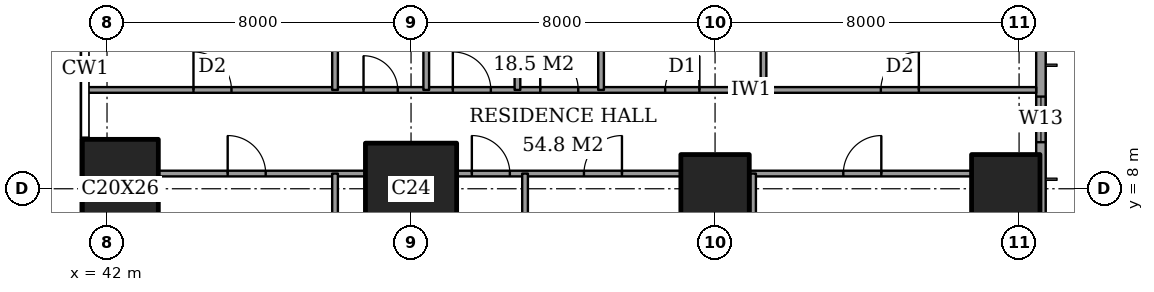
"""IFC4 building model, lengths in metres.
Left out: names, types, materials, properties, quantities, classifications, styles, units other than length and angle.
Written with IfcOpenShell. Run it as: python <this file> out.ifc"""

import sys

from ifc_helpers import new_model, si_unit, direction, frame, frame_2d, origin, origin_2d, place, context, subcontext, project, spatial, rectangle, extrude, element, fill, save


model = new_model("IFC4")
c1 = context("Model", 3, precision=1e-05, world=origin(), true_north=direction((0.0, 1.0)))
c2 = subcontext(c1, "Body", "Model", "MODEL_VIEW")
j1 = project(units=[si_unit("LENGTHUNIT", "METRE"), si_unit("PLANEANGLEUNIT", "RADIAN")], contexts=[c1])
p1 = place(None, origin())
s1 = spatial("IfcSite", under=j1, at=p1, CompositionType="ELEMENT")
p2 = place(p1, origin())
s2 = spatial("IfcBuilding", under=s1, at=p2, CompositionType="ELEMENT")
p3 = place(p2, frame((0.0, 0.0, 193.0)))
s3 = spatial("IfcBuildingStorey", under=s2, at=p3, CompositionType="ELEMENT", Elevation=193.0)
p4 = place(p3, frame((42.35, 8.0, 0.0), z_axis=(0.0, 0.0, 1.0), x_axis=(1.0, 0.0, 0.0)))
e1 = element("IfcColumn", 1, at=p4, inside=s3, PredefinedType="COLUMN", context=c2, shape_type="SweptSolid", body=[
    extrude(rectangle(XDim=2.0, YDim=2.6, at=origin_2d()), origin(), (0.0, 0.0, 1.0), 3.6),
])
p5 = place(p3, frame((50.0, 8.0, 0.0), z_axis=(0.0, 0.0, 1.0), x_axis=(1.0, 0.0, 0.0)))
e2 = element("IfcColumn", 2, at=p5, inside=s3, PredefinedType="COLUMN", context=c2, shape_type="SweptSolid", body=[
    extrude(rectangle(XDim=2.4, YDim=2.4, at=origin_2d()), origin(), (0.0, 0.0, 1.0), 3.6),
])
for number, where, z_axis, x_axis in (
    (3, (58.0, 8.0, 0.0), (0.0, 0.0, 1.0), (1.0, 0.0, 0.0)),
    (4, (65.65, 8.0, 0.0), (0.0, 0.0, 1.0), (1.0, 0.0, 0.0)),
):
    element("IfcColumn", number, at=place(p3, frame(where, z_axis=z_axis, x_axis=x_axis)), inside=s3, PredefinedType="COLUMN", context=c2, shape_type="SweptSolid", body=[
        extrude(rectangle(XDim=1.8, YDim=1.8, at=origin_2d()), origin(), (0.0, 0.0, 1.0), 3.6),
    ])
p6 = place(p3, frame((66.575, 3.175, 0.0), z_axis=(0.0, 0.0, 1.0), x_axis=(0.0, 1.0, 0.0)))
e5 = element("IfcWall", 5, at=p6, inside=s3, PredefinedType="SOLIDWALL", context=c2, shape_type="SweptSolid", body=[
    extrude(rectangle(XDim=41.65, YDim=0.25, at=frame_2d((20.825, 0.0))), origin(), (0.0, 0.0, 1.0), 3.6),
])
p7 = place(p6, frame((0.825, 0.0, 0.2)))
e6 = element("IfcOpeningElement", 6, at=p7, cuts=e5, PredefinedType="OPENING", context=c2, shape_type="SweptSolid", body=[
    extrude(rectangle(XDim=2.4, YDim=2.4, at=frame_2d((1.2, 1.2))), frame((0.0, 0.135, 0.0), z_axis=(0.0, -1.0, 0.0), x_axis=(1.0, 0.0, 0.0)), (0.0, 0.0, 1.0), 0.27),
])
p8 = place(p6, frame((6.05, 0.0, 0.2)))
e7 = element("IfcOpeningElement", 7, at=p8, cuts=e5, PredefinedType="OPENING", context=c2, shape_type="SweptSolid", body=[
    extrude(rectangle(XDim=1.2, YDim=2.4, at=frame_2d((0.6, 1.2))), frame((0.0, 0.135, 0.0), z_axis=(0.0, -1.0, 0.0), x_axis=(1.0, 0.0, 0.0)), (0.0, 0.0, 1.0), 0.27),
])
p9 = place(p6, frame((8.475, 0.0, 0.2)))
e8 = element("IfcOpeningElement", 8, at=p9, cuts=e5, PredefinedType="OPENING", context=c2, shape_type="SweptSolid", body=[
    extrude(rectangle(XDim=2.4, YDim=2.4, at=frame_2d((1.2, 1.2))), frame((0.0, 0.135, 0.0), z_axis=(0.0, -1.0, 0.0), x_axis=(1.0, 0.0, 0.0)), (0.0, 0.0, 1.0), 0.27),
])
p10 = place(p6, frame((15.675, 0.0, 0.2)))
e9 = element("IfcOpeningElement", 9, at=p10, cuts=e5, PredefinedType="OPENING", context=c2, shape_type="SweptSolid", body=[
    extrude(rectangle(XDim=2.4, YDim=2.4, at=frame_2d((1.2, 1.2))), frame((0.0, 0.135, 0.0), z_axis=(0.0, -1.0, 0.0), x_axis=(1.0, 0.0, 0.0)), (0.0, 0.0, 1.0), 0.27),
])
p11 = place(p6, frame((23.625, 0.0, 0.2)))
e10 = element("IfcOpeningElement", 10, at=p11, cuts=e5, PredefinedType="OPENING", context=c2, shape_type="SweptSolid", body=[
    extrude(rectangle(XDim=2.4, YDim=2.4, at=frame_2d((1.2, 1.2))), frame((0.0, 0.135, 0.0), z_axis=(0.0, -1.0, 0.0), x_axis=(1.0, 0.0, 0.0)), (0.0, 0.0, 1.0), 0.27),
])
p12 = place(p6, frame((30.775, 0.0, 0.2)))
e11 = element("IfcOpeningElement", 11, at=p12, cuts=e5, PredefinedType="OPENING", context=c2, shape_type="SweptSolid", body=[
    extrude(rectangle(XDim=2.4, YDim=2.4, at=frame_2d((1.2, 1.2))), frame((0.0, 0.135, 0.0), z_axis=(0.0, -1.0, 0.0), x_axis=(1.0, 0.0, 0.0)), (0.0, 0.0, 1.0), 0.27),
])
p13 = place(p6, frame((34.55, 0.0, 0.2)))
e12 = element("IfcOpeningElement", 12, at=p13, cuts=e5, PredefinedType="OPENING", context=c2, shape_type="SweptSolid", body=[
    extrude(rectangle(XDim=1.2, YDim=2.4, at=frame_2d((0.6, 1.2))), frame((0.0, 0.135, 0.0), z_axis=(0.0, -1.0, 0.0), x_axis=(1.0, 0.0, 0.0)), (0.0, 0.0, 1.0), 0.27),
])
p14 = place(p6, frame((38.425, 0.0, 0.2)))
e13 = element("IfcOpeningElement", 13, at=p14, cuts=e5, PredefinedType="OPENING", context=c2, shape_type="SweptSolid", body=[
    extrude(rectangle(XDim=2.4, YDim=2.4, at=frame_2d((1.2, 1.2))), frame((0.0, 0.135, 0.0), z_axis=(0.0, -1.0, 0.0), x_axis=(1.0, 0.0, 0.0)), (0.0, 0.0, 1.0), 0.27),
])
p15 = place(p3, frame((43.35, 8.4, 0.0), z_axis=(0.0, 0.0, 1.0), x_axis=(1.0, 0.0, 0.0)))
e14 = element("IfcWall", 14, at=p15, inside=s3, PredefinedType="PARTITIONING", context=c2, shape_type="SweptSolid", body=[
    extrude(rectangle(XDim=5.45, YDim=0.15, at=frame_2d((2.725, 0.0))), origin(), (0.0, 0.0, 1.0), 3.35),
])
p16 = place(p15, frame((1.825, 0.0, 0.0)))
e15 = element("IfcOpeningElement", 15, at=p16, cuts=e14, PredefinedType="OPENING", context=c2, shape_type="SweptSolid", body=[
    extrude(rectangle(XDim=1.0, YDim=2.1, at=frame_2d((0.5, 1.05))), frame((0.0, 0.085, 0.0), z_axis=(0.0, -1.0, 0.0), x_axis=(1.0, 0.0, 0.0)), (0.0, 0.0, 1.0), 0.17),
])
p17 = place(p3, frame((51.2, 8.4, 0.0), z_axis=(0.0, 0.0, 1.0), x_axis=(1.0, 0.0, 0.0)))
e16 = element("IfcWall", 16, at=p17, inside=s3, PredefinedType="PARTITIONING", context=c2, shape_type="SweptSolid", body=[
    extrude(rectangle(XDim=5.9, YDim=0.15, at=frame_2d((2.95, 0.0))), origin(), (0.0, 0.0, 1.0), 3.35),
])
p18 = place(p17, frame((3.35, 0.0, 0.0)))
e17 = element("IfcOpeningElement", 17, at=p18, cuts=e16, PredefinedType="OPENING", context=c2, shape_type="SweptSolid", body=[
    extrude(rectangle(XDim=1.0, YDim=2.1, at=frame_2d((0.5, 1.05))), frame((0.0, 0.085, 0.0), z_axis=(0.0, -1.0, 0.0), x_axis=(1.0, 0.0, 0.0)), (0.0, 0.0, 1.0), 0.17),
])
p19 = place(p17, frame((0.4, 0.0, 0.0)))
e18 = element("IfcOpeningElement", 18, at=p19, cuts=e16, PredefinedType="OPENING", context=c2, shape_type="SweptSolid", body=[
    extrude(rectangle(XDim=1.0, YDim=2.1, at=frame_2d((0.5, 1.05))), frame((0.0, 0.085, 0.0), z_axis=(0.0, -1.0, 0.0), x_axis=(1.0, 0.0, 0.0)), (0.0, 0.0, 1.0), 0.17),
])
p20 = place(p3, frame((58.9, 8.4, 0.0), z_axis=(0.0, 0.0, 1.0), x_axis=(1.0, 0.0, 0.0)))
e19 = element("IfcWall", 19, at=p20, inside=s3, PredefinedType="PARTITIONING", context=c2, shape_type="SweptSolid", body=[
    extrude(rectangle(XDim=5.85, YDim=0.15, at=frame_2d((2.925, 0.0))), origin(), (0.0, 0.0, 1.0), 3.35),
])
p21 = place(p20, frame((2.475, 0.0, 0.0)))
e20 = element("IfcOpeningElement", 20, at=p21, cuts=e19, PredefinedType="OPENING", context=c2, shape_type="SweptSolid", body=[
    extrude(rectangle(XDim=1.0, YDim=2.1, at=frame_2d((0.5, 1.05))), frame((0.0, 0.085, 0.0), z_axis=(0.0, -1.0, 0.0), x_axis=(1.0, 0.0, 0.0)), (0.0, 0.0, 1.0), 0.17),
])
p22 = place(p3, frame((41.439, 10.6, 0.0), z_axis=(0.0, 0.0, 1.0), x_axis=(1.0, 0.0, 0.0)))
e21 = element("IfcWall", 21, at=p22, inside=s3, PredefinedType="PARTITIONING", context=c2, shape_type="SweptSolid", body=[
    extrude(rectangle(XDim=25.011, YDim=0.15, at=frame_2d((12.505, 0.0))), origin(), (0.0, 0.0, 1.0), 3.35),
])
p23 = place(p22, frame((11.961, 0.0, 0.0)))
e22 = element("IfcOpeningElement", 22, at=p23, cuts=e21, PredefinedType="OPENING", context=c2, shape_type="SweptSolid", body=[
    extrude(rectangle(XDim=1.0, YDim=2.1, at=frame_2d((0.5, 1.05))), frame((0.0, 0.085, 0.0), z_axis=(0.0, -1.0, 0.0), x_axis=(1.0, 0.0, 0.0)), (0.0, 0.0, 1.0), 0.17),
])
p24 = place(p22, frame((20.924, 0.0, 0.0)))
e23 = element("IfcOpeningElement", 23, at=p24, cuts=e21, PredefinedType="OPENING", context=c2, shape_type="SweptSolid", body=[
    extrude(rectangle(XDim=1.0, YDim=2.1, at=frame_2d((0.5, 1.05))), frame((0.0, 0.085, 0.0), z_axis=(0.0, -1.0, 0.0), x_axis=(1.0, 0.0, 0.0)), (0.0, 0.0, 1.0), 0.17),
])
p25 = place(p22, frame((15.249, 0.0, 0.0)))
e24 = element("IfcOpeningElement", 24, at=p25, cuts=e21, PredefinedType="OPENING", context=c2, shape_type="SweptSolid", body=[
    extrude(rectangle(XDim=0.9, YDim=2.1, at=frame_2d((0.45, 1.05))), frame((0.0, 0.085, 0.0), z_axis=(0.0, -1.0, 0.0), x_axis=(1.0, 0.0, 0.0)), (0.0, 0.0, 1.0), 0.17),
])
p26 = place(p22, frame((9.661, 0.0, 0.0)))
e25 = element("IfcOpeningElement", 25, at=p26, cuts=e21, PredefinedType="OPENING", context=c2, shape_type="SweptSolid", body=[
    extrude(rectangle(XDim=1.0, YDim=2.1, at=frame_2d((0.5, 1.05))), frame((0.0, 0.085, 0.0), z_axis=(0.0, -1.0, 0.0), x_axis=(1.0, 0.0, 0.0)), (0.0, 0.0, 1.0), 0.17),
])
p27 = place(p22, frame((7.311, 0.0, 0.0)))
e26 = element("IfcOpeningElement", 26, at=p27, cuts=e21, PredefinedType="OPENING", context=c2, shape_type="SweptSolid", body=[
    extrude(rectangle(XDim=0.9, YDim=2.1, at=frame_2d((0.45, 1.05))), frame((0.0, 0.085, 0.0), z_axis=(0.0, -1.0, 0.0), x_axis=(1.0, 0.0, 0.0)), (0.0, 0.0, 1.0), 0.17),
])
p28 = place(p22, frame((2.836, 0.0, 0.0)))
e27 = element("IfcOpeningElement", 27, at=p28, cuts=e21, PredefinedType="OPENING", context=c2, shape_type="SweptSolid", body=[
    extrude(rectangle(XDim=1.0, YDim=2.1, at=frame_2d((0.5, 1.05))), frame((0.0, 0.085, 0.0), z_axis=(0.0, -1.0, 0.0), x_axis=(1.0, 0.0, 0.0)), (0.0, 0.0, 1.0), 0.17),
])
p29 = place(p3, frame((48.0, -0.45, 0.0), z_axis=(0.0, 0.0, 1.0), x_axis=(0.0, 1.0, 0.0)))
e28 = element("IfcWall", 28, at=p29, inside=s3, PredefinedType="PARTITIONING", context=c2, shape_type="SweptSolid", body=[
    extrude(rectangle(XDim=8.85, YDim=0.15, at=frame_2d((4.425, 0.0))), origin(), (0.0, 0.0, 1.0), 3.35),
])
p30 = place(p3, frame((48.0, 10.6, 0.0), z_axis=(0.0, 0.0, 1.0), x_axis=(0.0, 1.0, 0.0)))
e29 = element("IfcWall", 29, at=p30, inside=s3, PredefinedType="PARTITIONING", context=c2, shape_type="SweptSolid", body=[
    extrude(rectangle(XDim=8.4, YDim=0.15, at=frame_2d((4.2, 0.0))), origin(), (0.0, 0.0, 1.0), 3.35),
])
p31 = place(p30, frame((6.7, 0.0, 0.0)))
e30 = element("IfcOpeningElement", 30, at=p31, cuts=e29, PredefinedType="OPENING", context=c2, shape_type="SweptSolid", body=[
    extrude(rectangle(XDim=0.9, YDim=2.1, at=frame_2d((0.45, 1.05))), frame((0.0, 0.085, 0.0), z_axis=(0.0, -1.0, 0.0), x_axis=(1.0, 0.0, 0.0)), (0.0, 0.0, 1.0), 0.17),
])
p32 = place(p3, frame((50.4, 10.6, 0.0), z_axis=(0.0, 0.0, 1.0), x_axis=(0.0, 1.0, 0.0)))
e31 = element("IfcWall", 31, at=p32, inside=s3, PredefinedType="PARTITIONING", context=c2, shape_type="SweptSolid", body=[
    extrude(rectangle(XDim=4.2, YDim=0.15, at=frame_2d((2.1, 0.0))), origin(), (0.0, 0.0, 1.0), 3.35),
])
p33 = place(p3, frame((52.8, 10.6, 0.0), z_axis=(0.0, 0.0, 1.0), x_axis=(0.0, 1.0, 0.0)))
e32 = element("IfcWall", 32, at=p33, inside=s3, PredefinedType="PARTITIONING", context=c2, shape_type="SweptSolid", body=[
    extrude(rectangle(XDim=8.4, YDim=0.15, at=frame_2d((4.2, 0.0))), origin(), (0.0, 0.0, 1.0), 3.35),
])
p34 = place(p3, frame((53.0, -0.45, 0.0), z_axis=(0.0, 0.0, 1.0), x_axis=(0.0, 1.0, 0.0)))
e33 = element("IfcWall", 33, at=p34, inside=s3, PredefinedType="PARTITIONING", context=c2, shape_type="SweptSolid", body=[
    extrude(rectangle(XDim=8.85, YDim=0.15, at=frame_2d((4.425, 0.0))), origin(), (0.0, 0.0, 1.0), 3.35),
])
p35 = place(p3, frame((55.0, 10.6, 0.0), z_axis=(0.0, 0.0, 1.0), x_axis=(0.0, 1.0, 0.0)))
e34 = element("IfcWall", 34, at=p35, inside=s3, PredefinedType="PARTITIONING", context=c2, shape_type="SweptSolid", body=[
    extrude(rectangle(XDim=11.0, YDim=0.15, at=frame_2d((5.5, 0.0))), origin(), (0.0, 0.0, 1.0), 3.35),
])
p36 = place(p35, frame((9.2, 0.0, 0.0)))
e35 = element("IfcOpeningElement", 35, at=p36, cuts=e34, PredefinedType="OPENING", context=c2, shape_type="SweptSolid", body=[
    extrude(rectangle(XDim=1.0, YDim=2.1, at=frame_2d((0.5, 1.05))), frame((0.0, 0.085, 0.0), z_axis=(0.0, -1.0, 0.0), x_axis=(1.0, 0.0, 0.0)), (0.0, 0.0, 1.0), 0.17),
])
p37 = place(p3, frame((59.0, -0.45, 0.0), z_axis=(0.0, 0.0, 1.0), x_axis=(0.0, 1.0, 0.0)))
e36 = element("IfcWall", 36, at=p37, inside=s3, PredefinedType="PARTITIONING", context=c2, shape_type="SweptSolid", body=[
    extrude(rectangle(XDim=8.85, YDim=0.15, at=frame_2d((4.425, 0.0))), origin(), (0.0, 0.0, 1.0), 3.35),
])
p38 = place(p3, frame((59.275, 10.6, 0.0), z_axis=(0.0, 0.0, 1.0), x_axis=(0.0, 1.0, 0.0)))
e37 = element("IfcWall", 37, at=p38, inside=s3, PredefinedType="PARTITIONING", context=c2, shape_type="SweptSolid", body=[
    extrude(rectangle(XDim=4.2, YDim=0.15, at=frame_2d((2.1, 0.0))), origin(), (0.0, 0.0, 1.0), 3.35),
])
p39 = place(p8, origin())
e38 = element("IfcWindow", 38, at=p39, inside=s3, PartitioningType="SINGLE_PANEL", PredefinedType="WINDOW", context=c2, shape_type="SweptSolid", body=[
    extrude(rectangle(XDim=1.2, YDim=2.4, at=frame_2d((0.6, 1.2))), frame((0.0, 0.03, 0.0), z_axis=(0.0, -1.0, 0.0), x_axis=(1.0, 0.0, 0.0)), (0.0, 0.0, 1.0), 0.06),
])
fill(e7, e38)
p40 = place(p21, origin())
e39 = element("IfcDoor", 39, at=p40, inside=s3, OperationType="SINGLE_SWING_LEFT", PredefinedType="DOOR", context=c2, shape_type="SweptSolid", body=[
    extrude(rectangle(XDim=1.0, YDim=2.1, at=frame_2d((0.5, 1.05))), frame((0.0, 0.025, 0.0), z_axis=(0.0, -1.0, 0.0), x_axis=(1.0, 0.0, 0.0)), (0.0, 0.0, 1.0), 0.05),
])
fill(e20, e39)
p41 = place(p18, origin())
e40 = element("IfcDoor", 40, at=p41, inside=s3, OperationType="SINGLE_SWING_LEFT", PredefinedType="DOOR", context=c2, shape_type="SweptSolid", body=[
    extrude(rectangle(XDim=1.0, YDim=2.1, at=frame_2d((0.5, 1.05))), frame((0.0, 0.025, 0.0), z_axis=(0.0, -1.0, 0.0), x_axis=(1.0, 0.0, 0.0)), (0.0, 0.0, 1.0), 0.05),
])
fill(e17, e40)
p42 = place(p19, origin())
e41 = element("IfcDoor", 41, at=p42, inside=s3, OperationType="SINGLE_SWING_RIGHT", PredefinedType="DOOR", context=c2, shape_type="SweptSolid", body=[
    extrude(rectangle(XDim=1.0, YDim=2.1, at=frame_2d((0.5, 1.05))), frame((0.0, 0.025, 0.0), z_axis=(0.0, -1.0, 0.0), x_axis=(1.0, 0.0, 0.0)), (0.0, 0.0, 1.0), 0.05),
])
fill(e18, e41)
p43 = place(p16, origin())
e42 = element("IfcDoor", 42, at=p43, inside=s3, OperationType="SINGLE_SWING_RIGHT", PredefinedType="DOOR", context=c2, shape_type="SweptSolid", body=[
    extrude(rectangle(XDim=1.0, YDim=2.1, at=frame_2d((0.5, 1.05))), frame((0.0, 0.025, 0.0), z_axis=(0.0, -1.0, 0.0), x_axis=(1.0, 0.0, 0.0)), (0.0, 0.0, 1.0), 0.05),
])
fill(e15, e42)
p44 = place(p23, origin())
e43 = element("IfcDoor", 43, at=p44, inside=s3, OperationType="SINGLE_SWING_RIGHT", PredefinedType="DOOR", context=c2, shape_type="SweptSolid", body=[
    extrude(rectangle(XDim=1.0, YDim=2.1, at=frame_2d((0.5, 1.05))), frame((0.0, 0.025, 0.0), z_axis=(0.0, -1.0, 0.0), x_axis=(1.0, 0.0, 0.0)), (0.0, 0.0, 1.0), 0.05),
])
fill(e22, e43)
p45 = place(p24, origin())
e44 = element("IfcDoor", 44, at=p45, inside=s3, OperationType="SINGLE_SWING_LEFT", PredefinedType="DOOR", context=c2, shape_type="SweptSolid", body=[
    extrude(rectangle(XDim=1.0, YDim=2.1, at=frame_2d((0.5, 1.05))), frame((0.0, 0.025, 0.0), z_axis=(0.0, -1.0, 0.0), x_axis=(1.0, 0.0, 0.0)), (0.0, 0.0, 1.0), 0.05),
])
fill(e23, e44)
p46 = place(p25, origin())
e45 = element("IfcDoor", 45, at=p46, inside=s3, OperationType="SINGLE_SWING_LEFT", PredefinedType="DOOR", context=c2, shape_type="SweptSolid", body=[
    extrude(rectangle(XDim=0.9, YDim=2.1, at=frame_2d((0.45, 1.05))), frame((0.0, 0.025, 0.0), z_axis=(0.0, -1.0, 0.0), x_axis=(1.0, 0.0, 0.0)), (0.0, 0.0, 1.0), 0.05),
])
fill(e24, e45)
p47 = place(p26, origin())
e46 = element("IfcDoor", 46, at=p47, inside=s3, OperationType="SINGLE_SWING_RIGHT", PredefinedType="DOOR", context=c2, shape_type="SweptSolid", body=[
    extrude(rectangle(XDim=1.0, YDim=2.1, at=frame_2d((0.5, 1.05))), frame((0.0, 0.025, 0.0), z_axis=(0.0, -1.0, 0.0), x_axis=(1.0, 0.0, 0.0)), (0.0, 0.0, 1.0), 0.05),
])
fill(e25, e46)
p48 = place(p27, origin())
e47 = element("IfcDoor", 47, at=p48, inside=s3, OperationType="SINGLE_SWING_RIGHT", PredefinedType="DOOR", context=c2, shape_type="SweptSolid", body=[
    extrude(rectangle(XDim=0.9, YDim=2.1, at=frame_2d((0.45, 1.05))), frame((0.0, 0.025, 0.0), z_axis=(0.0, -1.0, 0.0), x_axis=(1.0, 0.0, 0.0)), (0.0, 0.0, 1.0), 0.05),
])
fill(e26, e47)
p49 = place(p28, origin())
e48 = element("IfcDoor", 48, at=p49, inside=s3, OperationType="SINGLE_SWING_RIGHT", PredefinedType="DOOR", context=c2, shape_type="SweptSolid", body=[
    extrude(rectangle(XDim=1.0, YDim=2.1, at=frame_2d((0.5, 1.05))), frame((0.0, 0.025, 0.0), z_axis=(0.0, -1.0, 0.0), x_axis=(1.0, 0.0, 0.0)), (0.0, 0.0, 1.0), 0.05),
])
fill(e27, e48)
save(model, sys.argv[1])
